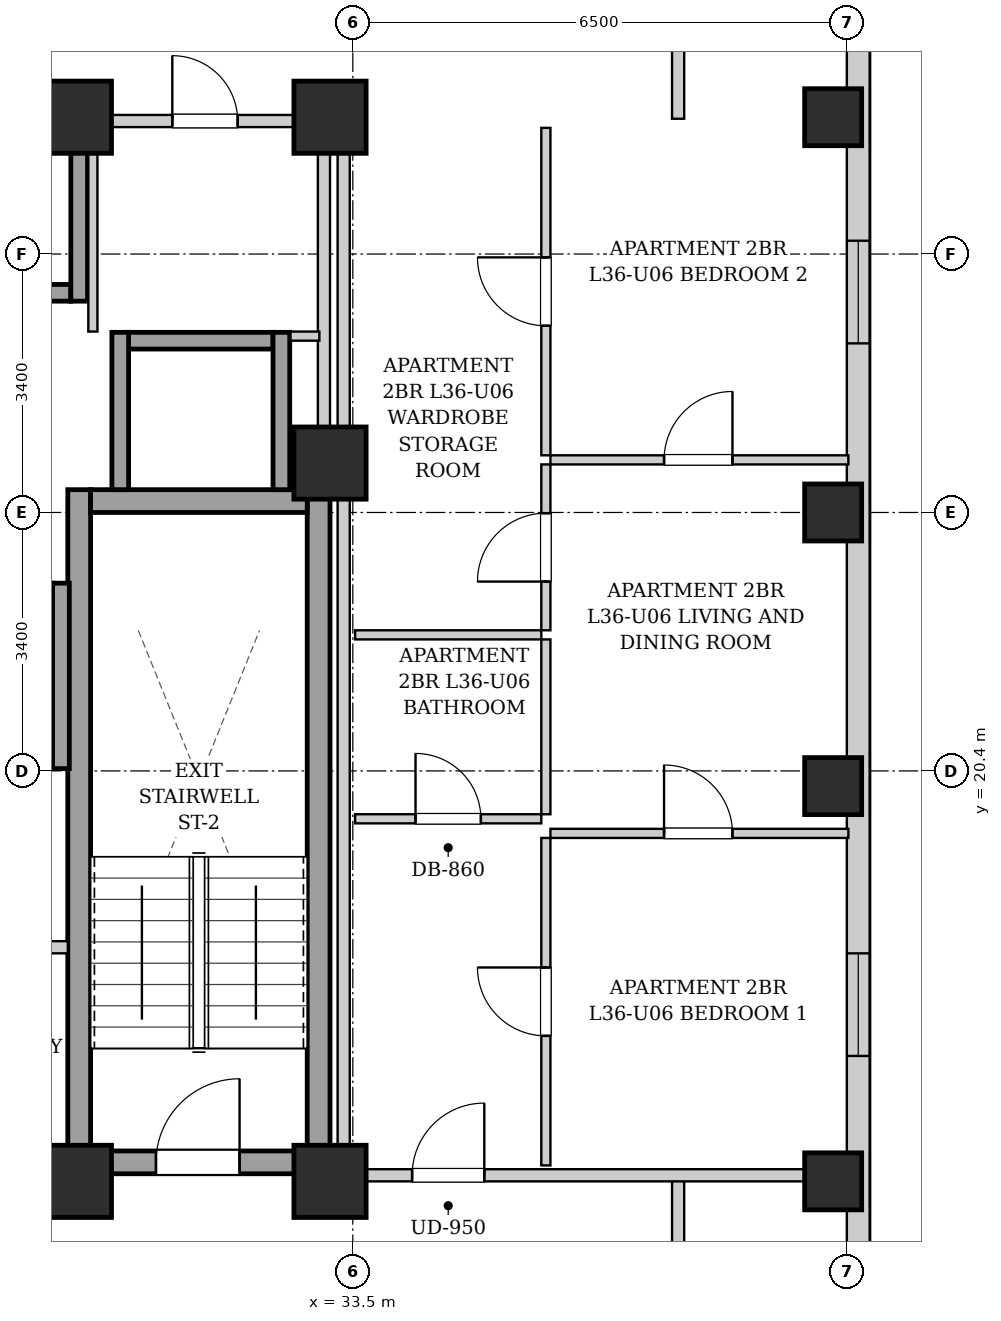
"""IFC4 building model, lengths in metres.
Left out: names, types, materials, properties, quantities, classifications, styles, units other than length and angle.
Written with IfcOpenShell. Run it as: python <this file> out.ifc"""

import sys

from ifc_helpers import new_model, si_unit, direction, frame, frame_2d, origin, origin_2d, place, context, subcontext, project, spatial, rectangle, extrude, element, fill, save


model = new_model("IFC4")
c1 = context("Model", 3, precision=1e-05, world=origin(), true_north=direction((0.0, 1.0)))
c2 = subcontext(c1, "Body", "Model", "MODEL_VIEW")
j1 = project(units=[si_unit("LENGTHUNIT", "METRE"), si_unit("PLANEANGLEUNIT", "RADIAN")], contexts=[c1])
p1 = place(None, origin())
s1 = spatial("IfcSite", under=j1, at=p1, CompositionType="ELEMENT")
p2 = place(p1, origin())
s2 = spatial("IfcBuilding", under=s1, at=p2, CompositionType="ELEMENT")
p3 = place(p2, frame((0.0, 0.0, 127.65)))
s3 = spatial("IfcBuildingStorey", under=s2, at=p3, CompositionType="ELEMENT", Elevation=127.65)
for number, where, z_axis, x_axis in (
    (1, (39.82, 15.0, 0.0), (0.0, 0.0, 1.0), (1.0, 0.0, 0.0)),
    (2, (39.82, 20.2, 0.0), (0.0, 0.0, 1.0), (1.0, 0.0, 0.0)),
    (3, (39.82, 23.8, 0.0), (0.0, 0.0, 1.0), (1.0, 0.0, 0.0)),
    (4, (39.82, 29.0, 0.0), (0.0, 0.0, 1.0), (1.0, 0.0, 0.0)),
):
    element("IfcColumn", number, at=place(p3, frame(where, z_axis=z_axis, x_axis=x_axis)), inside=s3, PredefinedType="COLUMN", context=c2, shape_type="SweptSolid", body=[
        extrude(rectangle(XDim=0.75, YDim=0.75, at=origin_2d()), origin(), (0.0, 0.0, 1.0), 3.25),
    ])
for number, where, z_axis, x_axis in (
    (5, (29.85, 15.0, 0.0), (0.0, 0.0, 1.0), (1.0, 0.0, 0.0)),
    (6, (33.2, 15.0, 0.0), (0.0, 0.0, 1.0), (1.0, 0.0, 0.0)),
    (7, (29.85, 29.0, 0.0), (0.0, 0.0, 1.0), (1.0, 0.0, 0.0)),
    (8, (33.2, 29.0, 0.0), (0.0, 0.0, 1.0), (1.0, 0.0, 0.0)),
    (9, (33.2, 24.45, 0.0), (0.0, 0.0, 1.0), (1.0, 0.0, 0.0)),
):
    element("IfcColumn", number, at=place(p3, frame(where, z_axis=z_axis, x_axis=x_axis)), inside=s3, PredefinedType="COLUMN", context=c2, shape_type="SweptSolid", body=[
        extrude(rectangle(XDim=0.95, YDim=0.95, at=origin_2d()), origin(), (0.0, 0.0, 1.0), 3.25),
    ])
p4 = place(p3, frame((40.15, 40.8, 0.0), z_axis=(0.0, 0.0, 1.0), x_axis=(0.0, -1.0, 0.0)))
e10 = element("IfcWall", 10, at=p4, inside=s3, PredefinedType="SOLIDWALL", context=c2, shape_type="SweptSolid", body=[
    extrude(rectangle(XDim=34.5, YDim=0.3, at=frame_2d((17.25, 0.0))), origin(), (0.0, 0.0, 1.0), 2.99),
])
p5 = place(p4, frame((31.575, 0.0, 0.55)))
e11 = element("IfcOpeningElement", 11, at=p5, cuts=e10, PredefinedType="OPENING", context=c2, shape_type="SweptSolid", body=[
    extrude(rectangle(XDim=1.35, YDim=1.2, at=frame_2d((0.675, 0.6))), frame((0.0, 0.16, 0.0), z_axis=(0.0, -1.0, 0.0), x_axis=(1.0, 0.0, 0.0)), (0.0, 0.0, 1.0), 0.32),
])
p6 = place(p4, frame((3.075, 0.0, 0.55)))
e12 = element("IfcOpeningElement", 12, at=p6, cuts=e10, PredefinedType="OPENING", context=c2, shape_type="SweptSolid", body=[
    extrude(rectangle(XDim=1.35, YDim=1.2, at=frame_2d((0.675, 0.6))), frame((0.0, 0.16, 0.0), z_axis=(0.0, -1.0, 0.0), x_axis=(1.0, 0.0, 0.0)), (0.0, 0.0, 1.0), 0.32),
])
p7 = place(p4, frame((1.085, 0.0, 0.55)))
e13 = element("IfcOpeningElement", 13, at=p7, cuts=e10, PredefinedType="OPENING", context=c2, shape_type="SweptSolid", body=[
    extrude(rectangle(XDim=1.35, YDim=1.2, at=frame_2d((0.675, 0.6))), frame((0.0, 0.16, 0.0), z_axis=(0.0, -1.0, 0.0), x_axis=(1.0, 0.0, 0.0)), (0.0, 0.0, 1.0), 0.32),
])
p8 = place(p4, frame((22.8, 0.0, 0.55)))
e14 = element("IfcOpeningElement", 14, at=p8, cuts=e10, PredefinedType="OPENING", context=c2, shape_type="SweptSolid", body=[
    extrude(rectangle(XDim=1.35, YDim=1.2, at=frame_2d((0.675, 0.6))), frame((0.0, 0.16, 0.0), z_axis=(0.0, -1.0, 0.0), x_axis=(1.0, 0.0, 0.0)), (0.0, 0.0, 1.0), 0.32),
])
p9 = place(p4, frame((13.425, 0.0, 0.55)))
e15 = element("IfcOpeningElement", 15, at=p9, cuts=e10, PredefinedType="OPENING", context=c2, shape_type="SweptSolid", body=[
    extrude(rectangle(XDim=1.35, YDim=1.2, at=frame_2d((0.675, 0.6))), frame((0.0, 0.16, 0.0), z_axis=(0.0, -1.0, 0.0), x_axis=(1.0, 0.0, 0.0)), (0.0, 0.0, 1.0), 0.32),
])
for number, where, z_axis, x_axis in (
    (16, (29.9, 15.1, 0.0), (0.0, 0.0, 1.0), (0.0, 1.0, 0.0)),
    (17, (33.05, 15.1, 0.0), (0.0, 0.0, 1.0), (0.0, 1.0, 0.0)),
):
    element("IfcWall", number, at=place(p3, frame(where, z_axis=z_axis, x_axis=x_axis)), inside=s3, PredefinedType="SHEAR", context=c2, shape_type="SweptSolid", body=[
        extrude(rectangle(XDim=9.0, YDim=0.3, at=frame_2d((4.5, 0.0))), origin(), (0.0, 0.0, 1.0), 2.99),
    ])
p10 = place(p3, frame((30.05, 23.95, 0.0), z_axis=(0.0, 0.0, 1.0), x_axis=(1.0, 0.0, 0.0)))
e18 = element("IfcWall", 18, at=p10, inside=s3, PredefinedType="SHEAR", context=c2, shape_type="SweptSolid", body=[
    extrude(rectangle(XDim=2.85, YDim=0.3, at=frame_2d((1.425, 0.0))), origin(), (0.0, 0.0, 1.0), 2.99),
])
p11 = place(p3, frame((30.05, 15.25, 0.0), z_axis=(0.0, 0.0, 1.0), x_axis=(1.0, 0.0, 0.0)))
e19 = element("IfcWall", 19, at=p11, inside=s3, PredefinedType="SHEAR", context=c2, shape_type="SweptSolid", body=[
    extrude(rectangle(XDim=2.85, YDim=0.3, at=frame_2d((1.425, 0.0))), origin(), (0.0, 0.0, 1.0), 2.99),
])
p12 = place(p11, frame((0.86, 0.0, 0.0)))
e20 = element("IfcOpeningElement", 20, at=p12, cuts=e19, PredefinedType="OPENING", context=c2, shape_type="SweptSolid", body=[
    extrude(rectangle(XDim=1.1, YDim=2.05, at=frame_2d((0.55, 1.025))), frame((0.0, 0.16, 0.0), z_axis=(0.0, -1.0, 0.0), x_axis=(1.0, 0.0, 0.0)), (0.0, 0.0, 1.0), 0.32),
])
for number, where, z_axis, x_axis in (
    (21, (27.93, 26.69, 0.0), (0.0, 0.0, 1.0), (1.0, 0.0, 0.0)),
    (22, (27.93, 28.91, 0.0), (0.0, 0.0, 1.0), (1.0, 0.0, 0.0)),
):
    element("IfcWall", number, at=place(p3, frame(where, z_axis=z_axis, x_axis=x_axis)), inside=s3, PredefinedType="SHEAR", context=c2, shape_type="SweptSolid", body=[
        extrude(rectangle(XDim=1.86, YDim=0.22, at=frame_2d((0.93, 0.0))), origin(), (0.0, 0.0, 1.0), 2.99),
    ])
p13 = place(p3, frame((29.9, 26.58, 0.0), z_axis=(0.0, 0.0, 1.0), x_axis=(0.0, 1.0, 0.0)))
e23 = element("IfcWall", 23, at=p13, inside=s3, PredefinedType="SHEAR", context=c2, shape_type="SweptSolid", body=[
    extrude(rectangle(XDim=2.44, YDim=0.22, at=frame_2d((1.22, 0.0))), origin(), (0.0, 0.0, 1.0), 2.99),
])
p14 = place(p3, frame((27.65, 20.54, 0.0), z_axis=(0.0, 0.0, 1.0), x_axis=(1.0, 0.0, 0.0)))
e24 = element("IfcWall", 24, at=p14, inside=s3, PredefinedType="SHEAR", context=c2, shape_type="SweptSolid", body=[
    extrude(rectangle(XDim=1.9, YDim=0.22, at=frame_2d((0.95, 0.0))), origin(), (0.0, 0.0, 1.0), 2.99),
])
p15 = place(p3, frame((27.65, 22.76, 0.0), z_axis=(0.0, 0.0, 1.0), x_axis=(1.0, 0.0, 0.0)))
e25 = element("IfcWall", 25, at=p15, inside=s3, PredefinedType="SHEAR", context=c2, shape_type="SweptSolid", body=[
    extrude(rectangle(XDim=1.9, YDim=0.22, at=frame_2d((0.95, 0.0))), origin(), (0.0, 0.0, 1.0), 2.99),
])
p16 = place(p15, frame((0.4, 0.0, 0.0)))
e26 = element("IfcOpeningElement", 26, at=p16, cuts=e25, PredefinedType="OPENING", context=c2, shape_type="SweptSolid", body=[
    extrude(rectangle(XDim=1.1, YDim=2.15, at=frame_2d((0.55, 1.075))), frame((0.0, 0.12, 0.0), z_axis=(0.0, -1.0, 0.0), x_axis=(1.0, 0.0, 0.0)), (0.0, 0.0, 1.0), 0.24),
])
p17 = place(p3, frame((29.66, 20.43, 0.0), z_axis=(0.0, 0.0, 1.0), x_axis=(0.0, 1.0, 0.0)))
e27 = element("IfcWall", 27, at=p17, inside=s3, PredefinedType="SHEAR", context=c2, shape_type="SweptSolid", body=[
    extrude(rectangle(XDim=2.44, YDim=0.22, at=frame_2d((1.22, 0.0))), origin(), (0.0, 0.0, 1.0), 2.99),
])
p18 = place(p3, frame((30.55, 26.06, 0.0), z_axis=(0.0, 0.0, 1.0), x_axis=(1.0, 0.0, 0.0)))
e28 = element("IfcWall", 28, at=p18, inside=s3, PredefinedType="SHEAR", context=c2, shape_type="SweptSolid", body=[
    extrude(rectangle(XDim=1.9, YDim=0.22, at=frame_2d((0.95, 0.0))), origin(), (0.0, 0.0, 1.0), 2.99),
])
for number, where, z_axis, x_axis in (
    (29, (30.44, 24.1, 0.0), (0.0, 0.0, 1.0), (0.0, 1.0, 0.0)),
    (30, (32.56, 24.1, 0.0), (0.0, 0.0, 1.0), (0.0, 1.0, 0.0)),
):
    element("IfcWall", number, at=place(p3, frame(where, z_axis=z_axis, x_axis=x_axis)), inside=s3, PredefinedType="SHEAR", context=c2, shape_type="SweptSolid", body=[
        extrude(rectangle(XDim=2.07, YDim=0.22, at=frame_2d((1.035, 0.0))), origin(), (0.0, 0.0, 1.0), 2.99),
    ])
p19 = place(p3, frame((21.25, 15.08, 0.0), z_axis=(0.0, 0.0, 1.0), x_axis=(1.0, 0.0, 0.0)))
e31 = element("IfcWall", 31, at=p19, inside=s3, PredefinedType="PARTITIONING", context=c2, shape_type="SweptSolid", body=[
    extrude(rectangle(XDim=8.5, YDim=0.16, at=frame_2d((4.25, 0.0))), origin(), (0.0, 0.0, 1.0), 2.426),
])
p20 = place(p19, frame((3.725, 0.0, 0.0)))
e32 = element("IfcOpeningElement", 32, at=p20, cuts=e31, PredefinedType="OPENING", context=c2, shape_type="SweptSolid", body=[
    extrude(rectangle(XDim=1.05, YDim=2.05, at=frame_2d((0.525, 1.025))), frame((0.0, 0.09, 0.0), z_axis=(0.0, -1.0, 0.0), x_axis=(1.0, 0.0, 0.0)), (0.0, 0.0, 1.0), 0.18),
])
p21 = place(p3, frame((28.65, 18.08, 0.0), z_axis=(0.0, 0.0, 1.0), x_axis=(1.0, 0.0, 0.0)))
e33 = element("IfcWall", 33, at=p21, inside=s3, PredefinedType="PARTITIONING", context=c2, shape_type="SweptSolid", body=[
    extrude(rectangle(XDim=1.1, YDim=0.16, at=frame_2d((0.55, 0.0))), origin(), (0.0, 0.0, 1.0), 2.99),
])
p22 = place(p3, frame((33.12, 24.12, 0.0), z_axis=(0.0, 0.0, 1.0), x_axis=(0.0, 1.0, 0.0)))
e34 = element("IfcWall", 34, at=p22, inside=s3, PredefinedType="PARTITIONING", context=c2, shape_type="SweptSolid", body=[
    extrude(rectangle(XDim=4.76, YDim=0.16, at=frame_2d((2.38, 0.0))), origin(), (0.0, 0.0, 1.0), 2.325),
])
p23 = place(p3, frame((30.08, 26.18, 0.0), z_axis=(0.0, 0.0, 1.0), x_axis=(0.0, 1.0, 0.0)))
e35 = element("IfcWall", 35, at=p23, inside=s3, PredefinedType="PARTITIONING", context=c2, shape_type="SweptSolid", body=[
    extrude(rectangle(XDim=2.68, YDim=0.12, at=frame_2d((1.34, 0.0))), origin(), (0.0, 0.0, 1.0), 2.99),
])
p24 = place(p3, frame((32.68, 26.12, 0.0), z_axis=(0.0, 0.0, 1.0), x_axis=(1.0, 0.0, 0.0)))
e36 = element("IfcWall", 36, at=p24, inside=s3, PredefinedType="PARTITIONING", context=c2, shape_type="SweptSolid", body=[
    extrude(rectangle(XDim=0.38, YDim=0.12, at=frame_2d((0.19, 0.0))), origin(), (0.0, 0.0, 1.0), 2.99),
])
p25 = place(p3, frame((30.08, 28.95, 0.0), z_axis=(0.0, 0.0, 1.0), x_axis=(1.0, 0.0, 0.0)))
e37 = element("IfcWall", 37, at=p25, inside=s3, PredefinedType="PARTITIONING", context=c2, shape_type="SweptSolid", body=[
    extrude(rectangle(XDim=2.96, YDim=0.16, at=frame_2d((1.48, 0.0))), origin(), (0.0, 0.0, 1.0), 2.99),
])
p26 = place(p25, frame((1.045, 0.0, 0.0)))
e38 = element("IfcOpeningElement", 38, at=p26, cuts=e37, PredefinedType="OPENING", context=c2, shape_type="SweptSolid", body=[
    extrude(rectangle(XDim=0.86, YDim=2.05, at=frame_2d((0.43, 1.025))), frame((0.0, 0.09, 0.0), z_axis=(0.0, -1.0, 0.0), x_axis=(1.0, 0.0, 0.0)), (0.0, 0.0, 1.0), 0.18),
])
for number, where, z_axis, x_axis in (
    (39, (37.78, 13.35, 0.0), (0.0, 0.0, 1.0), (0.0, 1.0, 0.0)),
    (40, (37.78, 28.98, 0.0), (0.0, 0.0, 1.0), (0.0, 1.0, 0.0)),
):
    element("IfcWall", number, at=place(p3, frame(where, z_axis=z_axis, x_axis=x_axis)), inside=s3, PredefinedType="PARTITIONING", context=c2, shape_type="SweptSolid", body=[
        extrude(rectangle(XDim=1.74, YDim=0.16, at=frame_2d((0.87, 0.0))), origin(), (0.0, 0.0, 1.0), 2.99),
    ])
p27 = place(p3, frame((33.38, 15.08, 0.0), z_axis=(0.0, 0.0, 1.0), x_axis=(1.0, 0.0, 0.0)))
e41 = element("IfcWall", 41, at=p27, inside=s3, PredefinedType="PARTITIONING", context=c2, shape_type="SweptSolid", body=[
    extrude(rectangle(XDim=6.64, YDim=0.16, at=frame_2d((3.32, 0.0))), origin(), (0.0, 0.0, 1.0), 2.426),
])
p28 = place(p27, frame((0.9, 0.0, 0.0)))
e42 = element("IfcOpeningElement", 42, at=p28, cuts=e41, PredefinedType="OPENING", context=c2, shape_type="SweptSolid", body=[
    extrude(rectangle(XDim=0.95, YDim=2.1, at=frame_2d((0.475, 1.05))), frame((0.0, 0.09, 0.0), z_axis=(0.0, -1.0, 0.0), x_axis=(1.0, 0.0, 0.0)), (0.0, 0.0, 1.0), 0.18),
])
p29 = place(p3, frame((33.53, 22.19, 0.0), z_axis=(0.0, 0.0, 1.0), x_axis=(1.0, 0.0, 0.0)))
e43 = element("IfcWall", 43, at=p29, inside=s3, PredefinedType="PARTITIONING", context=c2, shape_type="SweptSolid", body=[
    extrude(rectangle(XDim=2.45, YDim=0.12, at=frame_2d((1.225, 0.0))), origin(), (0.0, 0.0, 1.0), 2.99),
])
p30 = place(p3, frame((36.04, 22.25, 0.0), z_axis=(0.0, 0.0, 1.0), x_axis=(0.0, 1.0, 0.0)))
e44 = element("IfcWall", 44, at=p30, inside=s3, PredefinedType="PARTITIONING", context=c2, shape_type="SweptSolid", body=[
    extrude(rectangle(XDim=2.182, YDim=0.12, at=frame_2d((1.091, 0.0))), origin(), (0.0, 0.0, 1.0), 2.99),
])
p31 = place(p30, frame((0.641, 0.0, 0.0)))
e45 = element("IfcOpeningElement", 45, at=p31, cuts=e44, PredefinedType="OPENING", context=c2, shape_type="SweptSolid", body=[
    extrude(rectangle(XDim=0.9, YDim=2.05, at=frame_2d((0.45, 1.025))), frame((0.0, 0.07, 0.0), z_axis=(0.0, -1.0, 0.0), x_axis=(1.0, 0.0, 0.0)), (0.0, 0.0, 1.0), 0.14),
])
p32 = place(p3, frame((36.04, 24.552, 0.0), z_axis=(0.0, 0.0, 1.0), x_axis=(0.0, 1.0, 0.0)))
e46 = element("IfcWall", 46, at=p32, inside=s3, PredefinedType="PARTITIONING", context=c2, shape_type="SweptSolid", body=[
    extrude(rectangle(XDim=4.308, YDim=0.12, at=frame_2d((2.154, 0.0))), origin(), (0.0, 0.0, 1.0), 2.99),
])
p33 = place(p32, frame((1.704, 0.0, 0.0)))
e47 = element("IfcOpeningElement", 47, at=p33, cuts=e46, PredefinedType="OPENING", context=c2, shape_type="SweptSolid", body=[
    extrude(rectangle(XDim=0.9, YDim=2.05, at=frame_2d((0.45, 1.025))), frame((0.0, 0.07, 0.0), z_axis=(0.0, -1.0, 0.0), x_axis=(1.0, 0.0, 0.0)), (0.0, 0.0, 1.0), 0.14),
])
p34 = place(p3, frame((33.53, 19.77, 0.0), z_axis=(0.0, 0.0, 1.0), x_axis=(1.0, 0.0, 0.0)))
e48 = element("IfcWall", 48, at=p34, inside=s3, PredefinedType="PARTITIONING", context=c2, shape_type="SweptSolid", body=[
    extrude(rectangle(XDim=2.45, YDim=0.12, at=frame_2d((1.225, 0.0))), origin(), (0.0, 0.0, 1.0), 2.99),
])
p35 = place(p34, frame((0.795, 0.0, 0.0)))
e49 = element("IfcOpeningElement", 49, at=p35, cuts=e48, PredefinedType="OPENING", context=c2, shape_type="SweptSolid", body=[
    extrude(rectangle(XDim=0.86, YDim=2.05, at=frame_2d((0.43, 1.025))), frame((0.0, 0.07, 0.0), z_axis=(0.0, -1.0, 0.0), x_axis=(1.0, 0.0, 0.0)), (0.0, 0.0, 1.0), 0.14),
])
p36 = place(p3, frame((36.04, 19.83, 0.0), z_axis=(0.0, 0.0, 1.0), x_axis=(0.0, 1.0, 0.0)))
e50 = element("IfcWall", 50, at=p36, inside=s3, PredefinedType="PARTITIONING", context=c2, shape_type="SweptSolid", body=[
    extrude(rectangle(XDim=2.3, YDim=0.12, at=frame_2d((1.15, 0.0))), origin(), (0.0, 0.0, 1.0), 2.99),
])
p37 = place(p3, frame((36.04, 15.21, 0.0), z_axis=(0.0, 0.0, 1.0), x_axis=(0.0, 1.0, 0.0)))
e51 = element("IfcWall", 51, at=p37, inside=s3, PredefinedType="PARTITIONING", context=c2, shape_type="SweptSolid", body=[
    extrude(rectangle(XDim=4.308, YDim=0.12, at=frame_2d((2.154, 0.0))), origin(), (0.0, 0.0, 1.0), 2.99),
])
p38 = place(p37, frame((1.704, 0.0, 0.0)))
e52 = element("IfcOpeningElement", 52, at=p38, cuts=e51, PredefinedType="OPENING", context=c2, shape_type="SweptSolid", body=[
    extrude(rectangle(XDim=0.9, YDim=2.05, at=frame_2d((0.45, 1.025))), frame((0.0, 0.07, 0.0), z_axis=(0.0, -1.0, 0.0), x_axis=(1.0, 0.0, 0.0)), (0.0, 0.0, 1.0), 0.14),
])
p39 = place(p3, frame((36.1, 19.578, 0.0), z_axis=(0.0, 0.0, 1.0), x_axis=(1.0, 0.0, 0.0)))
e53 = element("IfcWall", 53, at=p39, inside=s3, PredefinedType="PARTITIONING", context=c2, shape_type="SweptSolid", body=[
    extrude(rectangle(XDim=3.92, YDim=0.12, at=frame_2d((1.96, 0.0))), origin(), (0.0, 0.0, 1.0), 2.99),
])
p40 = place(p39, frame((1.495, 0.0, 0.0)))
e54 = element("IfcOpeningElement", 54, at=p40, cuts=e53, PredefinedType="OPENING", context=c2, shape_type="SweptSolid", body=[
    extrude(rectangle(XDim=0.9, YDim=2.05, at=frame_2d((0.45, 1.025))), frame((0.0, 0.07, 0.0), z_axis=(0.0, -1.0, 0.0), x_axis=(1.0, 0.0, 0.0)), (0.0, 0.0, 1.0), 0.14),
])
p41 = place(p3, frame((36.1, 24.492, 0.0), z_axis=(0.0, 0.0, 1.0), x_axis=(1.0, 0.0, 0.0)))
e55 = element("IfcWall", 55, at=p41, inside=s3, PredefinedType="PARTITIONING", context=c2, shape_type="SweptSolid", body=[
    extrude(rectangle(XDim=3.92, YDim=0.12, at=frame_2d((1.96, 0.0))), origin(), (0.0, 0.0, 1.0), 2.621),
])
p42 = place(p41, frame((1.495, 0.0, 0.0)))
e56 = element("IfcOpeningElement", 56, at=p42, cuts=e55, PredefinedType="OPENING", context=c2, shape_type="SweptSolid", body=[
    extrude(rectangle(XDim=0.9, YDim=2.05, at=frame_2d((0.45, 1.025))), frame((0.0, 0.07, 0.0), z_axis=(0.0, -1.0, 0.0), x_axis=(1.0, 0.0, 0.0)), (0.0, 0.0, 1.0), 0.14),
])
p43 = place(p3, frame((33.38, 15.02, 0.0), z_axis=(0.0, 0.0, 1.0), x_axis=(0.0, 1.0, 0.0)))
e57 = element("IfcWall", 57, at=p43, inside=s3, PredefinedType="PARTITIONING", context=c2, shape_type="SweptSolid", body=[
    extrude(rectangle(XDim=13.98, YDim=0.16, at=frame_2d((6.99, 0.0))), origin(), (0.0, 0.0, 1.0), 2.325),
])
p44 = place(p12, origin())
e58 = element("IfcDoor", 58, at=p44, inside=s3, OperationType="SINGLE_SWING_RIGHT", PredefinedType="DOOR", context=c2, shape_type="SweptSolid", body=[
    extrude(rectangle(XDim=1.1, YDim=2.05, at=frame_2d((0.55, 1.025))), frame((0.0, 0.025, 0.0), z_axis=(0.0, -1.0, 0.0), x_axis=(1.0, 0.0, 0.0)), (0.0, 0.0, 1.0), 0.05),
])
fill(e20, e58)
p45 = place(p26, origin())
e59 = element("IfcDoor", 59, at=p45, inside=s3, OperationType="SINGLE_SWING_LEFT", PredefinedType="DOOR", context=c2, shape_type="SweptSolid", body=[
    extrude(rectangle(XDim=0.86, YDim=2.05, at=frame_2d((0.43, 1.025))), frame((0.0, 0.025, 0.0), z_axis=(0.0, -1.0, 0.0), x_axis=(1.0, 0.0, 0.0)), (0.0, 0.0, 1.0), 0.05),
])
fill(e38, e59)
p46 = place(p28, origin())
e60 = element("IfcDoor", 60, at=p46, inside=s3, OperationType="SINGLE_SWING_RIGHT", PredefinedType="DOOR", context=c2, shape_type="SweptSolid", body=[
    extrude(rectangle(XDim=0.95, YDim=2.1, at=frame_2d((0.475, 1.05))), frame((0.0, 0.025, 0.0), z_axis=(0.0, -1.0, 0.0), x_axis=(1.0, 0.0, 0.0)), (0.0, 0.0, 1.0), 0.05),
])
fill(e42, e60)
p47 = place(p31, origin())
e61 = element("IfcDoor", 61, at=p47, inside=s3, OperationType="SINGLE_SWING_LEFT", PredefinedType="DOOR", context=c2, shape_type="SweptSolid", body=[
    extrude(rectangle(XDim=0.9, YDim=2.05, at=frame_2d((0.45, 1.025))), frame((0.0, 0.025, 0.0), z_axis=(0.0, -1.0, 0.0), x_axis=(1.0, 0.0, 0.0)), (0.0, 0.0, 1.0), 0.05),
])
fill(e45, e61)
p48 = place(p33, origin())
e62 = element("IfcDoor", 62, at=p48, inside=s3, OperationType="SINGLE_SWING_RIGHT", PredefinedType="DOOR", context=c2, shape_type="SweptSolid", body=[
    extrude(rectangle(XDim=0.9, YDim=2.05, at=frame_2d((0.45, 1.025))), frame((0.0, 0.025, 0.0), z_axis=(0.0, -1.0, 0.0), x_axis=(1.0, 0.0, 0.0)), (0.0, 0.0, 1.0), 0.05),
])
fill(e47, e62)
p49 = place(p35, origin())
e63 = element("IfcDoor", 63, at=p49, inside=s3, OperationType="SINGLE_SWING_LEFT", PredefinedType="DOOR", context=c2, shape_type="SweptSolid", body=[
    extrude(rectangle(XDim=0.86, YDim=2.05, at=frame_2d((0.43, 1.025))), frame((0.0, 0.025, 0.0), z_axis=(0.0, -1.0, 0.0), x_axis=(1.0, 0.0, 0.0)), (0.0, 0.0, 1.0), 0.05),
])
fill(e49, e63)
p50 = place(p38, origin())
e64 = element("IfcDoor", 64, at=p50, inside=s3, OperationType="SINGLE_SWING_RIGHT", PredefinedType="DOOR", context=c2, shape_type="SweptSolid", body=[
    extrude(rectangle(XDim=0.9, YDim=2.05, at=frame_2d((0.45, 1.025))), frame((0.0, 0.025, 0.0), z_axis=(0.0, -1.0, 0.0), x_axis=(1.0, 0.0, 0.0)), (0.0, 0.0, 1.0), 0.05),
])
fill(e52, e64)
p51 = place(p40, origin())
e65 = element("IfcDoor", 65, at=p51, inside=s3, OperationType="SINGLE_SWING_LEFT", PredefinedType="DOOR", context=c2, shape_type="SweptSolid", body=[
    extrude(rectangle(XDim=0.9, YDim=2.05, at=frame_2d((0.45, 1.025))), frame((0.0, 0.025, 0.0), z_axis=(0.0, -1.0, 0.0), x_axis=(1.0, 0.0, 0.0)), (0.0, 0.0, 1.0), 0.05),
])
fill(e54, e65)
p52 = place(p42, origin())
e66 = element("IfcDoor", 66, at=p52, inside=s3, OperationType="SINGLE_SWING_RIGHT", PredefinedType="DOOR", context=c2, shape_type="SweptSolid", body=[
    extrude(rectangle(XDim=0.9, YDim=2.05, at=frame_2d((0.45, 1.025))), frame((0.0, 0.025, 0.0), z_axis=(0.0, -1.0, 0.0), x_axis=(1.0, 0.0, 0.0)), (0.0, 0.0, 1.0), 0.05),
])
fill(e56, e66)
p53 = place(p8, origin())
e67 = element("IfcWindow", 67, at=p53, inside=s3, PartitioningType="SINGLE_PANEL", PredefinedType="WINDOW", context=c2, shape_type="SweptSolid", body=[
    extrude(rectangle(XDim=1.35, YDim=1.2, at=frame_2d((0.675, 0.6))), frame((0.0, 0.03, 0.0), z_axis=(0.0, -1.0, 0.0), x_axis=(1.0, 0.0, 0.0)), (0.0, 0.0, 1.0), 0.06),
])
fill(e14, e67)
p54 = place(p9, origin())
e68 = element("IfcWindow", 68, at=p54, inside=s3, PartitioningType="SINGLE_PANEL", PredefinedType="WINDOW", context=c2, shape_type="SweptSolid", body=[
    extrude(rectangle(XDim=1.35, YDim=1.2, at=frame_2d((0.675, 0.6))), frame((0.0, 0.03, 0.0), z_axis=(0.0, -1.0, 0.0), x_axis=(1.0, 0.0, 0.0)), (0.0, 0.0, 1.0), 0.06),
])
fill(e15, e68)
save(model, sys.argv[1])
